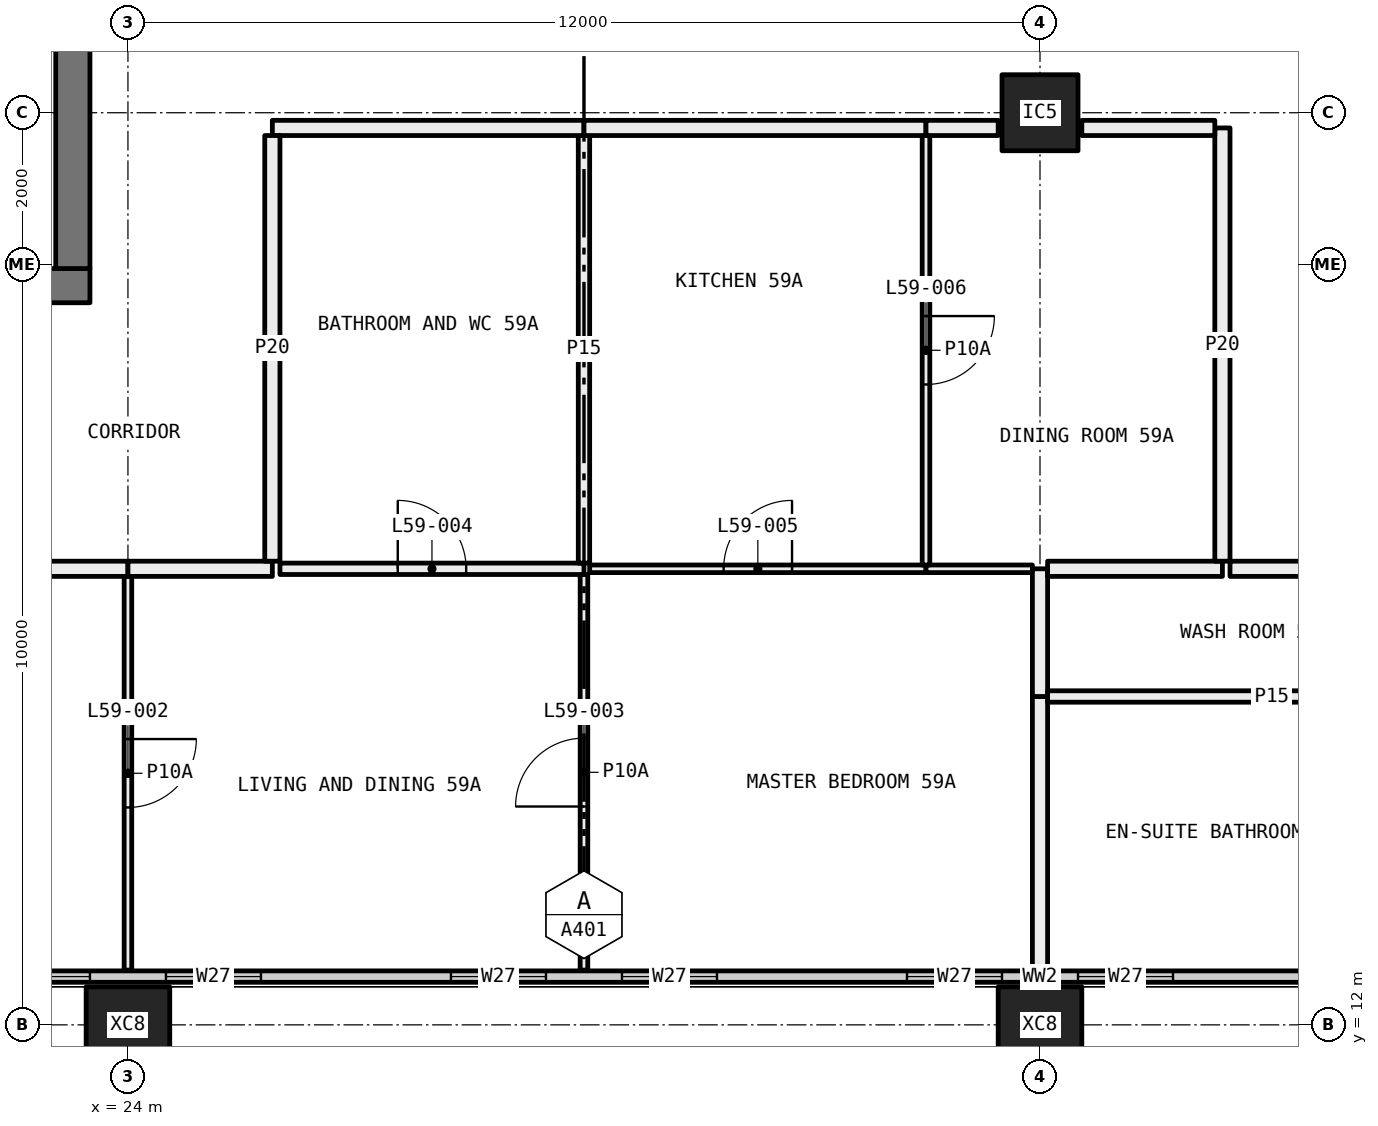
"""IFC4 building model, lengths in metres.
Left out: names, types, materials, properties, quantities, classifications, styles, units other than length and angle.
Written with IfcOpenShell. Run it as: python <this file> out.ifc"""

import sys

from ifc_helpers import new_model, si_unit, direction, frame, frame_2d, origin, origin_2d, place, context, subcontext, project, spatial, rectangle, hollow_rectangle, extrude, element, fill, save


model = new_model("IFC4")
c1 = context("Model", 3, precision=1e-05, world=origin(), true_north=direction((0.0, 1.0)))
c2 = subcontext(c1, "Body", "Model", "MODEL_VIEW")
j1 = project(units=[si_unit("LENGTHUNIT", "METRE"), si_unit("PLANEANGLEUNIT", "RADIAN")], contexts=[c1])
p1 = place(None, origin())
s1 = spatial("IfcSite", under=j1, at=p1, CompositionType="ELEMENT")
p2 = place(p1, origin())
s2 = spatial("IfcBuilding", under=s1, at=p2, CompositionType="ELEMENT")
p3 = place(p2, frame((0.0, 0.0, 221.4)))
s3 = spatial("IfcBuildingStorey", under=s2, at=p3, CompositionType="ELEMENT", Elevation=221.4)
for number, where, z_axis, x_axis in (
    (1, (24.0, 12.0, -0.4), (0.0, 0.0, 1.0), (1.0, 0.0, 0.0)),
    (2, (36.0, 12.0, -0.4), (0.0, 0.0, 1.0), (1.0, 0.0, 0.0)),
):
    element("IfcColumn", number, at=place(p3, frame(where, z_axis=z_axis, x_axis=x_axis)), inside=s3, PredefinedType="COLUMN", context=c2, shape_type="SweptSolid", body=[
        extrude(hollow_rectangle(XDim=1.1, YDim=1.0, WallThickness=0.04, at=origin_2d()), origin(), (0.0, 0.0, 1.0), 3.45),
    ])
p4 = place(p3, frame((36.0, 24.0, 0.0), z_axis=(0.0, 0.0, 1.0), x_axis=(1.0, 0.0, 0.0)))
e3 = element("IfcColumn", 3, at=p4, inside=s3, PredefinedType="COLUMN", context=c2, shape_type="SweptSolid", body=[
    extrude(hollow_rectangle(XDim=1.0, YDim=1.0, WallThickness=0.04, at=origin_2d()), origin(), (0.0, 0.0, 1.0), 3.05),
])
p5 = place(p3, frame((18.56, 12.635, 0.0), z_axis=(0.0, 0.0, 1.0), x_axis=(1.0, 0.0, 0.0)))
e4 = element("IfcWall", 4, at=p5, inside=s3, PredefinedType="ELEMENTEDWALL", context=c2, shape_type="SweptSolid", body=[
    extrude(rectangle(XDim=34.88, YDim=0.15, at=frame_2d((17.44, 0.0))), origin(), (0.0, 0.0, 1.0), 3.05),
])
p6 = place(p5, frame((0.44, 0.0, 0.45)))
e5 = element("IfcOpeningElement", 5, at=p6, cuts=e4, PredefinedType="OPENING", context=c2, shape_type="SweptSolid", body=[
    extrude(rectangle(XDim=4.5, YDim=2.55, at=frame_2d((2.25, 1.275))), frame((0.0, 0.085, 0.0), z_axis=(0.0, -1.0, 0.0), x_axis=(1.0, 0.0, 0.0)), (0.0, 0.0, 1.0), 0.17),
])
p7 = place(p5, frame((5.94, 0.0, 0.45)))
e6 = element("IfcOpeningElement", 6, at=p7, cuts=e4, PredefinedType="OPENING", context=c2, shape_type="SweptSolid", body=[
    extrude(rectangle(XDim=1.25, YDim=2.55, at=frame_2d((0.625, 1.275))), frame((0.0, 0.085, 0.0), z_axis=(0.0, -1.0, 0.0), x_axis=(1.0, 0.0, 0.0)), (0.0, 0.0, 1.0), 0.17),
])
p8 = place(p5, frame((9.69, 0.0, 0.45)))
e7 = element("IfcOpeningElement", 7, at=p8, cuts=e4, PredefinedType="OPENING", context=c2, shape_type="SweptSolid", body=[
    extrude(rectangle(XDim=1.25, YDim=2.55, at=frame_2d((0.625, 1.275))), frame((0.0, 0.085, 0.0), z_axis=(0.0, -1.0, 0.0), x_axis=(1.0, 0.0, 0.0)), (0.0, 0.0, 1.0), 0.17),
])
p9 = place(p5, frame((11.94, 0.0, 0.45)))
e8 = element("IfcOpeningElement", 8, at=p9, cuts=e4, PredefinedType="OPENING", context=c2, shape_type="SweptSolid", body=[
    extrude(rectangle(XDim=1.25, YDim=2.55, at=frame_2d((0.625, 1.275))), frame((0.0, 0.085, 0.0), z_axis=(0.0, -1.0, 0.0), x_axis=(1.0, 0.0, 0.0)), (0.0, 0.0, 1.0), 0.17),
])
p10 = place(p5, frame((15.69, 0.0, 0.45)))
e9 = element("IfcOpeningElement", 9, at=p10, cuts=e4, PredefinedType="OPENING", context=c2, shape_type="SweptSolid", body=[
    extrude(rectangle(XDim=1.25, YDim=2.55, at=frame_2d((0.625, 1.275))), frame((0.0, 0.085, 0.0), z_axis=(0.0, -1.0, 0.0), x_axis=(1.0, 0.0, 0.0)), (0.0, 0.0, 1.0), 0.17),
])
p11 = place(p5, frame((17.94, 0.0, 0.45)))
e10 = element("IfcOpeningElement", 10, at=p11, cuts=e4, PredefinedType="OPENING", context=c2, shape_type="SweptSolid", body=[
    extrude(rectangle(XDim=1.25, YDim=2.55, at=frame_2d((0.625, 1.275))), frame((0.0, 0.085, 0.0), z_axis=(0.0, -1.0, 0.0), x_axis=(1.0, 0.0, 0.0)), (0.0, 0.0, 1.0), 0.17),
])
p12 = place(p5, frame((21.69, 0.0, 0.45)))
e11 = element("IfcOpeningElement", 11, at=p12, cuts=e4, PredefinedType="OPENING", context=c2, shape_type="SweptSolid", body=[
    extrude(rectangle(XDim=1.25, YDim=2.55, at=frame_2d((0.625, 1.275))), frame((0.0, 0.085, 0.0), z_axis=(0.0, -1.0, 0.0), x_axis=(1.0, 0.0, 0.0)), (0.0, 0.0, 1.0), 0.17),
])
p13 = place(p5, frame((23.94, 0.0, 0.45)))
e12 = element("IfcOpeningElement", 12, at=p13, cuts=e4, PredefinedType="OPENING", context=c2, shape_type="SweptSolid", body=[
    extrude(rectangle(XDim=1.25, YDim=2.55, at=frame_2d((0.625, 1.275))), frame((0.0, 0.085, 0.0), z_axis=(0.0, -1.0, 0.0), x_axis=(1.0, 0.0, 0.0)), (0.0, 0.0, 1.0), 0.17),
])
p14 = place(p5, frame((27.69, 0.0, 0.45)))
e13 = element("IfcOpeningElement", 13, at=p14, cuts=e4, PredefinedType="OPENING", context=c2, shape_type="SweptSolid", body=[
    extrude(rectangle(XDim=1.25, YDim=2.55, at=frame_2d((0.625, 1.275))), frame((0.0, 0.085, 0.0), z_axis=(0.0, -1.0, 0.0), x_axis=(1.0, 0.0, 0.0)), (0.0, 0.0, 1.0), 0.17),
])
p15 = place(p5, frame((29.94, 0.0, 0.45)))
e14 = element("IfcOpeningElement", 14, at=p15, cuts=e4, PredefinedType="OPENING", context=c2, shape_type="SweptSolid", body=[
    extrude(rectangle(XDim=4.5, YDim=2.55, at=frame_2d((2.25, 1.275))), frame((0.0, 0.085, 0.0), z_axis=(0.0, -1.0, 0.0), x_axis=(1.0, 0.0, 0.0)), (0.0, 0.0, 1.0), 0.17),
])
p16 = place(p3, frame((24.0, 12.72, 0.0), z_axis=(0.0, 0.0, 1.0), x_axis=(0.0, 1.0, 0.0)))
e15 = element("IfcWall", 15, at=p16, inside=s3, PredefinedType="PARTITIONING", context=c2, shape_type="SweptSolid", body=[
    extrude(rectangle(XDim=5.18, YDim=0.1, at=frame_2d((2.59, 0.0))), origin(), (0.0, 0.0, 1.0), 3.05),
])
p17 = place(p16, frame((2.14, 0.0, 0.0)))
e16 = element("IfcOpeningElement", 16, at=p17, cuts=e15, PredefinedType="OPENING", context=c2, shape_type="SweptSolid", body=[
    extrude(rectangle(XDim=0.9, YDim=2.1, at=frame_2d((0.45, 1.05))), frame((0.0, 0.06, 0.0), z_axis=(0.0, -1.0, 0.0), x_axis=(1.0, 0.0, 0.0)), (0.0, 0.0, 1.0), 0.12),
])
p18 = place(p3, frame((24.0, 18.0, 0.0), z_axis=(0.0, 0.0, 1.0), x_axis=(-1.0, 0.0, 0.0)))
e17 = element("IfcWall", 17, at=p18, inside=s3, PredefinedType="PARTITIONING", context=c2, shape_type="SweptSolid", body=[
    extrude(rectangle(XDim=5.28, YDim=0.2, at=frame_2d((2.64, 0.0))), origin(), (0.0, 0.0, 1.0), 3.05),
])
p19 = place(p18, frame((2.14, 0.0, 0.0)))
e18 = element("IfcOpeningElement", 18, at=p19, cuts=e17, PredefinedType="OPENING", context=c2, shape_type="SweptSolid", body=[
    extrude(rectangle(XDim=1.0, YDim=2.1, at=frame_2d((0.5, 1.05))), frame((0.0, 0.11, 0.0), z_axis=(0.0, -1.0, 0.0), x_axis=(1.0, 0.0, 0.0)), (0.0, 0.0, 1.0), 0.22),
])
p20 = place(p3, frame((30.0, 12.72, 0.0), z_axis=(0.0, 0.0, 1.0), x_axis=(0.0, 1.0, 0.0)))
e19 = element("IfcWall", 19, at=p20, inside=s3, PredefinedType="PARTITIONING", context=c2, shape_type="SweptSolid", body=[
    extrude(rectangle(XDim=5.205, YDim=0.1, at=frame_2d((2.603, 0.0))), origin(), (0.0, 0.0, 1.0), 3.05),
])
p21 = place(p20, frame((2.153, 0.0, 0.0)))
e20 = element("IfcOpeningElement", 20, at=p21, cuts=e19, PredefinedType="OPENING", context=c2, shape_type="SweptSolid", body=[
    extrude(rectangle(XDim=0.9, YDim=2.1, at=frame_2d((0.45, 1.05))), frame((0.0, 0.06, 0.0), z_axis=(0.0, -1.0, 0.0), x_axis=(1.0, 0.0, 0.0)), (0.0, 0.0, 1.0), 0.12),
])
p22 = place(p3, frame((30.0, 18.0, 0.0), z_axis=(0.0, 0.0, 1.0), x_axis=(-1.0, 0.0, 0.0)))
e21 = element("IfcWall", 21, at=p22, inside=s3, PredefinedType="PARTITIONING", context=c2, shape_type="SweptSolid", body=[
    extrude(rectangle(XDim=4.0, YDim=0.15, at=frame_2d((2.0, 0.0))), origin(), (0.0, 0.0, 1.0), 3.05),
])
p23 = place(p22, frame((1.55, 0.0, 0.0)))
e22 = element("IfcOpeningElement", 22, at=p23, cuts=e21, PredefinedType="OPENING", context=c2, shape_type="SweptSolid", body=[
    extrude(rectangle(XDim=0.9, YDim=2.1, at=frame_2d((0.45, 1.05))), frame((0.0, 0.085, 0.0), z_axis=(0.0, -1.0, 0.0), x_axis=(1.0, 0.0, 0.0)), (0.0, 0.0, 1.0), 0.17),
])
p24 = place(p3, frame((25.9, 18.0, 0.0), z_axis=(0.0, 0.0, 1.0), x_axis=(-1.0, 0.0, 0.0)))
e23 = element("IfcWall", 23, at=p24, inside=s3, PredefinedType="PARTITIONING", context=c2, shape_type="SweptSolid", body=[
    extrude(rectangle(XDim=1.9, YDim=0.2, at=frame_2d((0.95, 0.0))), origin(), (0.0, 0.0, 1.0), 3.05),
])
p25 = place(p3, frame((34.5, 18.0, 0.0), z_axis=(0.0, 0.0, 1.0), x_axis=(-1.0, 0.0, 0.0)))
e24 = element("IfcWall", 24, at=p25, inside=s3, PredefinedType="PARTITIONING", context=c2, shape_type="SweptSolid", body=[
    extrude(rectangle(XDim=4.425, YDim=0.1, at=frame_2d((2.212, 0.0))), origin(), (0.0, 0.0, 1.0), 3.05),
])
p26 = place(p25, frame((1.762, 0.0, 0.0)))
e25 = element("IfcOpeningElement", 25, at=p26, cuts=e24, PredefinedType="OPENING", context=c2, shape_type="SweptSolid", body=[
    extrude(rectangle(XDim=0.9, YDim=2.1, at=frame_2d((0.45, 1.05))), frame((0.0, 0.06, 0.0), z_axis=(0.0, -1.0, 0.0), x_axis=(1.0, 0.0, 0.0)), (0.0, 0.0, 1.0), 0.12),
])
p27 = place(p3, frame((35.9, 18.0, 0.0), z_axis=(0.0, 0.0, 1.0), x_axis=(-1.0, 0.0, 0.0)))
e26 = element("IfcWall", 26, at=p27, inside=s3, PredefinedType="PARTITIONING", context=c2, shape_type="SweptSolid", body=[
    extrude(rectangle(XDim=1.4, YDim=0.1, at=frame_2d((0.7, 0.0))), origin(), (0.0, 0.0, 1.0), 3.05),
])
p28 = place(p3, frame((36.0, 12.72, 0.0), z_axis=(0.0, 0.0, 1.0), x_axis=(0.0, 1.0, 0.0)))
e27 = element("IfcWall", 27, at=p28, inside=s3, PredefinedType="PARTITIONING", context=c2, shape_type="SweptSolid", body=[
    extrude(rectangle(XDim=3.6, YDim=0.2, at=frame_2d((1.8, 0.0))), origin(), (0.0, 0.0, 1.0), 2.45),
])
p29 = place(p3, frame((36.0, 16.32, 0.0), z_axis=(0.0, 0.0, 1.0), x_axis=(0.0, 1.0, 0.0)))
e28 = element("IfcWall", 28, at=p29, inside=s3, PredefinedType="PARTITIONING", context=c2, shape_type="SweptSolid", body=[
    extrude(rectangle(XDim=1.68, YDim=0.2, at=frame_2d((0.84, 0.0))), origin(), (0.0, 0.0, 1.0), 2.45),
])
p30 = place(p3, frame((30.0, 18.075, 0.0), z_axis=(0.0, 0.0, 1.0), x_axis=(0.0, 1.0, 0.0)))
e29 = element("IfcWall", 29, at=p30, inside=s3, PredefinedType="PARTITIONING", context=c2, shape_type="SweptSolid", body=[
    extrude(rectangle(XDim=5.625, YDim=0.15, at=frame_2d((2.812, 0.0))), origin(), (0.0, 0.0, 1.0), 3.05),
])
p31 = place(p3, frame((30.0, 23.8, 0.0), z_axis=(0.0, 0.0, 1.0), x_axis=(-1.0, 0.0, 0.0)))
e30 = element("IfcWall", 30, at=p31, inside=s3, PredefinedType="PARTITIONING", context=c2, shape_type="SweptSolid", body=[
    extrude(rectangle(XDim=4.1, YDim=0.2, at=frame_2d((2.05, 0.0))), origin(), (0.0, 0.0, 1.0), 3.05),
])
p32 = place(p3, frame((25.9, 23.7, 0.0), z_axis=(0.0, 0.0, 1.0), x_axis=(0.0, -1.0, 0.0)))
e31 = element("IfcWall", 31, at=p32, inside=s3, PredefinedType="PARTITIONING", context=c2, shape_type="SweptSolid", body=[
    extrude(rectangle(XDim=5.6, YDim=0.2, at=frame_2d((2.8, 0.0))), origin(), (0.0, 0.0, 1.0), 3.05),
])
p33 = place(p3, frame((34.5, 18.05, 0.0), z_axis=(0.0, 0.0, 1.0), x_axis=(0.0, 1.0, 0.0)))
e32 = element("IfcWall", 32, at=p33, inside=s3, PredefinedType="PARTITIONING", context=c2, shape_type="SweptSolid", body=[
    extrude(rectangle(XDim=5.65, YDim=0.1, at=frame_2d((2.825, 0.0))), origin(), (0.0, 0.0, 1.0), 3.05),
])
p34 = place(p33, frame((2.375, 0.0, 0.0)))
e33 = element("IfcOpeningElement", 33, at=p34, cuts=e32, PredefinedType="OPENING", context=c2, shape_type="SweptSolid", body=[
    extrude(rectangle(XDim=0.9, YDim=2.1, at=frame_2d((0.45, 1.05))), frame((0.0, 0.06, 0.0), z_axis=(0.0, -1.0, 0.0), x_axis=(1.0, 0.0, 0.0)), (0.0, 0.0, 1.0), 0.12),
])
p35 = place(p3, frame((34.5, 23.8, 0.0), z_axis=(0.0, 0.0, 1.0), x_axis=(-1.0, 0.0, 0.0)))
e34 = element("IfcWall", 34, at=p35, inside=s3, PredefinedType="PARTITIONING", context=c2, shape_type="SweptSolid", body=[
    extrude(rectangle(XDim=4.5, YDim=0.2, at=frame_2d((2.25, 0.0))), origin(), (0.0, 0.0, 1.0), 3.05),
])
p36 = place(p3, frame((36.1, 18.0, 0.0), z_axis=(0.0, 0.0, 1.0), x_axis=(1.0, 0.0, 0.0)))
e35 = element("IfcWall", 35, at=p36, inside=s3, PredefinedType="PARTITIONING", context=c2, shape_type="SweptSolid", body=[
    extrude(rectangle(XDim=2.3, YDim=0.2, at=frame_2d((1.15, 0.0))), origin(), (0.0, 0.0, 1.0), 3.05),
])
p37 = place(p3, frame((35.45, 23.8, 0.0), z_axis=(0.0, 0.0, 1.0), x_axis=(-1.0, 0.0, 0.0)))
e36 = element("IfcWall", 36, at=p37, inside=s3, PredefinedType="PARTITIONING", context=c2, shape_type="SweptSolid", body=[
    extrude(rectangle(XDim=0.95, YDim=0.2, at=frame_2d((0.475, 0.0))), origin(), (0.0, 0.0, 1.0), 3.05),
])
p38 = place(p3, frame((38.4, 18.1, 0.0), z_axis=(0.0, 0.0, 1.0), x_axis=(0.0, 1.0, 0.0)))
e37 = element("IfcWall", 37, at=p38, inside=s3, PredefinedType="PARTITIONING", context=c2, shape_type="SweptSolid", body=[
    extrude(rectangle(XDim=5.7, YDim=0.2, at=frame_2d((2.85, 0.0))), origin(), (0.0, 0.0, 1.0), 3.05),
])
p39 = place(p3, frame((38.3, 23.8, 0.0), z_axis=(0.0, 0.0, 1.0), x_axis=(-1.0, 0.0, 0.0)))
e38 = element("IfcWall", 38, at=p39, inside=s3, PredefinedType="PARTITIONING", context=c2, shape_type="SweptSolid", body=[
    extrude(rectangle(XDim=1.75, YDim=0.2, at=frame_2d((0.875, 0.0))), origin(), (0.0, 0.0, 1.0), 3.05),
])
p40 = place(p3, frame((42.0, 16.32, 0.0), z_axis=(0.0, 0.0, 1.0), x_axis=(-1.0, 0.0, 0.0)))
e39 = element("IfcWall", 39, at=p40, inside=s3, PredefinedType="PARTITIONING", context=c2, shape_type="SweptSolid", body=[
    extrude(rectangle(XDim=5.9, YDim=0.15, at=frame_2d((2.95, 0.0))), origin(), (0.0, 0.0, 1.0), 3.05),
])
p41 = place(p3, frame((40.8, 18.0, 0.0), z_axis=(0.0, 0.0, 1.0), x_axis=(-1.0, 0.0, 0.0)))
e40 = element("IfcWall", 40, at=p41, inside=s3, PredefinedType="PARTITIONING", context=c2, shape_type="SweptSolid", body=[
    extrude(rectangle(XDim=2.3, YDim=0.2, at=frame_2d((1.15, 0.0))), origin(), (0.0, 0.0, 1.0), 3.05),
])
p42 = place(p3, frame((12.5, 21.725, 0.0), z_axis=(0.0, 0.0, 1.0), x_axis=(1.0, 0.0, 0.0)))
e41 = element("IfcWall", 41, at=p42, inside=s3, PredefinedType="SHEAR", context=c2, shape_type="SweptSolid", body=[
    extrude(rectangle(XDim=11.0, YDim=0.45, at=frame_2d((5.5, 0.0))), origin(), (0.0, 0.0, 1.0), 3.05),
])
p43 = place(p42, frame((1.125, 0.0, 0.0)))
e42 = element("IfcOpeningElement", 42, at=p43, cuts=e41, PredefinedType="OPENING", context=c2, shape_type="SweptSolid", body=[
    extrude(rectangle(XDim=1.0, YDim=2.1, at=frame_2d((0.5, 1.05))), frame((0.0, 0.235, 0.0), z_axis=(0.0, -1.0, 0.0), x_axis=(1.0, 0.0, 0.0)), (0.0, 0.0, 1.0), 0.47),
])
p44 = place(p3, frame((23.275, 21.95, 0.0), z_axis=(0.0, 0.0, 1.0), x_axis=(0.0, 1.0, 0.0)))
e43 = element("IfcWall", 43, at=p44, inside=s3, PredefinedType="SHEAR", context=c2, shape_type="SweptSolid", body=[
    extrude(rectangle(XDim=16.1, YDim=0.45, at=frame_2d((8.05, 0.0))), origin(), (0.0, 0.0, 1.0), 3.05),
])
p45 = place(p44, frame((7.25, 0.0, 0.0)))
e44 = element("IfcOpeningElement", 44, at=p45, cuts=e43, PredefinedType="OPENING", context=c2, shape_type="SweptSolid", body=[
    extrude(rectangle(XDim=1.6, YDim=2.1, at=frame_2d((0.8, 1.05))), frame((0.0, 0.235, 0.0), z_axis=(0.0, -1.0, 0.0), x_axis=(1.0, 0.0, 0.0)), (0.0, 0.0, 1.0), 0.47),
])
p46 = place(p6, origin())
e45 = element("IfcWindow", 45, at=p46, inside=s3, PartitioningType="SINGLE_PANEL", PredefinedType="WINDOW", context=c2, shape_type="SweptSolid", body=[
    extrude(rectangle(XDim=4.5, YDim=2.55, at=frame_2d((2.25, 1.275))), frame((0.0, 0.03, 0.0), z_axis=(0.0, -1.0, 0.0), x_axis=(1.0, 0.0, 0.0)), (0.0, 0.0, 1.0), 0.06),
])
fill(e5, e45)
p47 = place(p7, origin())
e46 = element("IfcWindow", 46, at=p47, inside=s3, PartitioningType="SINGLE_PANEL", PredefinedType="WINDOW", context=c2, shape_type="SweptSolid", body=[
    extrude(rectangle(XDim=1.25, YDim=2.55, at=frame_2d((0.625, 1.275))), frame((0.0, 0.03, 0.0), z_axis=(0.0, -1.0, 0.0), x_axis=(1.0, 0.0, 0.0)), (0.0, 0.0, 1.0), 0.06),
])
fill(e6, e46)
p48 = place(p8, origin())
e47 = element("IfcWindow", 47, at=p48, inside=s3, PartitioningType="SINGLE_PANEL", PredefinedType="WINDOW", context=c2, shape_type="SweptSolid", body=[
    extrude(rectangle(XDim=1.25, YDim=2.55, at=frame_2d((0.625, 1.275))), frame((0.0, 0.03, 0.0), z_axis=(0.0, -1.0, 0.0), x_axis=(1.0, 0.0, 0.0)), (0.0, 0.0, 1.0), 0.06),
])
fill(e7, e47)
p49 = place(p9, origin())
e48 = element("IfcWindow", 48, at=p49, inside=s3, PartitioningType="SINGLE_PANEL", PredefinedType="WINDOW", context=c2, shape_type="SweptSolid", body=[
    extrude(rectangle(XDim=1.25, YDim=2.55, at=frame_2d((0.625, 1.275))), frame((0.0, 0.03, 0.0), z_axis=(0.0, -1.0, 0.0), x_axis=(1.0, 0.0, 0.0)), (0.0, 0.0, 1.0), 0.06),
])
fill(e8, e48)
p50 = place(p10, origin())
e49 = element("IfcWindow", 49, at=p50, inside=s3, PartitioningType="SINGLE_PANEL", PredefinedType="WINDOW", context=c2, shape_type="SweptSolid", body=[
    extrude(rectangle(XDim=1.25, YDim=2.55, at=frame_2d((0.625, 1.275))), frame((0.0, 0.03, 0.0), z_axis=(0.0, -1.0, 0.0), x_axis=(1.0, 0.0, 0.0)), (0.0, 0.0, 1.0), 0.06),
])
fill(e9, e49)
p51 = place(p11, origin())
e50 = element("IfcWindow", 50, at=p51, inside=s3, PartitioningType="SINGLE_PANEL", PredefinedType="WINDOW", context=c2, shape_type="SweptSolid", body=[
    extrude(rectangle(XDim=1.25, YDim=2.55, at=frame_2d((0.625, 1.275))), frame((0.0, 0.03, 0.0), z_axis=(0.0, -1.0, 0.0), x_axis=(1.0, 0.0, 0.0)), (0.0, 0.0, 1.0), 0.06),
])
fill(e10, e50)
p52 = place(p17, frame((0.9, 0.0, 0.0), x_axis=(-1.0, 0.0, 0.0)))
e51 = element("IfcDoor", 51, at=p52, inside=s3, OperationType="SINGLE_SWING_RIGHT", PredefinedType="DOOR", context=c2, shape_type="SweptSolid", body=[
    extrude(rectangle(XDim=0.9, YDim=2.1, at=frame_2d((0.45, 1.05))), frame((0.0, 0.025, 0.0), z_axis=(0.0, -1.0, 0.0), x_axis=(1.0, 0.0, 0.0)), (0.0, 0.0, 1.0), 0.05),
])
fill(e16, e51)
p53 = place(p21, origin())
e52 = element("IfcDoor", 52, at=p53, inside=s3, OperationType="SINGLE_SWING_RIGHT", PredefinedType="DOOR", context=c2, shape_type="SweptSolid", body=[
    extrude(rectangle(XDim=0.9, YDim=2.1, at=frame_2d((0.45, 1.05))), frame((0.0, 0.025, 0.0), z_axis=(0.0, -1.0, 0.0), x_axis=(1.0, 0.0, 0.0)), (0.0, 0.0, 1.0), 0.05),
])
fill(e20, e52)
p54 = place(p23, frame((0.9, 0.0, 0.0), x_axis=(-1.0, 0.0, 0.0)))
e53 = element("IfcDoor", 53, at=p54, inside=s3, OperationType="SINGLE_SWING_RIGHT", PredefinedType="DOOR", context=c2, shape_type="SweptSolid", body=[
    extrude(rectangle(XDim=0.9, YDim=2.1, at=frame_2d((0.45, 1.05))), frame((0.0, 0.025, 0.0), z_axis=(0.0, -1.0, 0.0), x_axis=(1.0, 0.0, 0.0)), (0.0, 0.0, 1.0), 0.05),
])
fill(e22, e53)
p55 = place(p26, frame((0.9, 0.0, 0.0), x_axis=(-1.0, 0.0, 0.0)))
e54 = element("IfcDoor", 54, at=p55, inside=s3, OperationType="SINGLE_SWING_LEFT", PredefinedType="DOOR", context=c2, shape_type="SweptSolid", body=[
    extrude(rectangle(XDim=0.9, YDim=2.1, at=frame_2d((0.45, 1.05))), frame((0.0, 0.025, 0.0), z_axis=(0.0, -1.0, 0.0), x_axis=(1.0, 0.0, 0.0)), (0.0, 0.0, 1.0), 0.05),
])
fill(e25, e54)
p56 = place(p34, frame((0.9, 0.0, 0.0), x_axis=(-1.0, 0.0, 0.0)))
e55 = element("IfcDoor", 55, at=p56, inside=s3, OperationType="SINGLE_SWING_RIGHT", PredefinedType="DOOR", context=c2, shape_type="SweptSolid", body=[
    extrude(rectangle(XDim=0.9, YDim=2.1, at=frame_2d((0.45, 1.05))), frame((0.0, 0.025, 0.0), z_axis=(0.0, -1.0, 0.0), x_axis=(1.0, 0.0, 0.0)), (0.0, 0.0, 1.0), 0.05),
])
fill(e33, e55)
save(model, sys.argv[1])
